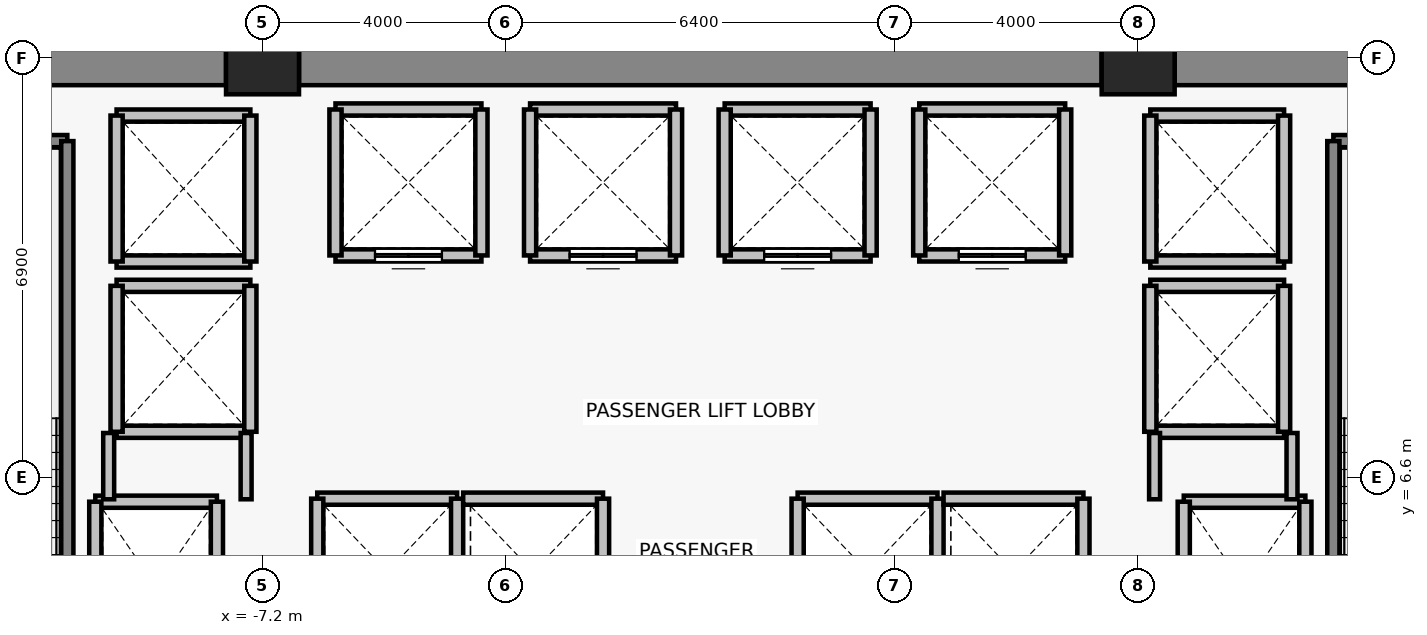
"""IFC4 building model, lengths in metres.
Left out: names, types, materials, properties, quantities, classifications, styles, units other than length and angle.
Written with IfcOpenShell. Run it as: python <this file> out.ifc"""

import sys

from ifc_helpers import new_model, si_unit, direction, frame, frame_2d, origin, origin_2d, place, context, subcontext, project, spatial, rectangle, extrude, source, transform, mapped, element, fill, save


model = new_model("IFC4")
c1 = context("Model", 3, precision=1e-05, world=origin(), true_north=direction((0.0, 1.0)))
c2 = subcontext(c1, "Body", "Model", "MODEL_VIEW")
j1 = project(units=[si_unit("LENGTHUNIT", "METRE"), si_unit("PLANEANGLEUNIT", "RADIAN")], contexts=[c1])
p1 = place(None, origin())
s1 = spatial("IfcSite", under=j1, at=p1, CompositionType="ELEMENT")
p2 = place(p1, origin())
s2 = spatial("IfcBuilding", under=s1, at=p2, CompositionType="ELEMENT")
p3 = place(p2, frame((0.0, 0.0, 53.8)))
s3 = spatial("IfcBuildingStorey", under=s2, at=p3, CompositionType="ELEMENT", Elevation=53.8)
for number, where, z_axis, x_axis in (
    (1, (-7.2, 13.5, 0.0), (0.0, 0.0, 1.0), (1.0, 0.0, 0.0)),
    (2, (7.2, 13.5, 0.0), (0.0, 0.0, 1.0), (1.0, 0.0, 0.0)),
):
    element("IfcColumn", number, at=place(p3, frame(where, z_axis=z_axis, x_axis=x_axis)), inside=s3, PredefinedType="COLUMN", context=c2, shape_type="SweptSolid", body=[
        extrude(rectangle(XDim=1.2, YDim=1.2, at=origin_2d()), origin(), (0.0, 0.0, 1.0), 3.3),
    ])
p4 = place(p3, frame((-13.8, 13.5, 0.0), z_axis=(0.0, 0.0, 1.0), x_axis=(1.0, 0.0, 0.0)))
e3 = element("IfcWall", 3, at=p4, inside=s3, PredefinedType="SHEAR", context=c2, shape_type="SweptSolid", body=[
    extrude(rectangle(XDim=6.0, YDim=0.9, at=frame_2d((3.0, 0.0))), origin(), (0.0, 0.0, 1.0), 3.075),
])
p5 = place(p3, frame((-6.6, 13.5, 0.0), z_axis=(0.0, 0.0, 1.0), x_axis=(1.0, 0.0, 0.0)))
e4 = element("IfcWall", 4, at=p5, inside=s3, PredefinedType="SHEAR", context=c2, shape_type="SweptSolid", body=[
    extrude(rectangle(XDim=13.2, YDim=0.9, at=frame_2d((6.6, 0.0))), origin(), (0.0, 0.0, 1.0), 3.075),
])
p6 = place(p3, frame((7.8, 13.5, 0.0), z_axis=(0.0, 0.0, 1.0), x_axis=(1.0, 0.0, 0.0)))
e5 = element("IfcWall", 5, at=p6, inside=s3, PredefinedType="SHEAR", context=c2, shape_type="SweptSolid", body=[
    extrude(rectangle(XDim=6.0, YDim=0.9, at=frame_2d((3.0, 0.0))), origin(), (0.0, 0.0, 1.0), 3.075),
])
p7 = place(p3, frame((-9.95, 6.2, 0.0), z_axis=(0.0, 0.0, 1.0), x_axis=(1.0, 0.0, 0.0)))
e6 = element("IfcWall", 6, at=p7, inside=s3, PredefinedType="SOLIDWALL", context=c2, shape_type="SweptSolid", body=[
    extrude(rectangle(XDim=2.0, YDim=0.2, at=frame_2d((1.0, 0.0))), origin(), (0.0, 0.0, 1.0), 3.075),
])
for number, where, z_axis, x_axis in (
    (7, (-9.95, 3.4, 0.0), (0.0, 0.0, 1.0), (0.0, 1.0, 0.0)),
    (8, (-7.95, 6.2, 0.0), (0.0, 0.0, 1.0), (0.0, -1.0, 0.0)),
):
    element("IfcWall", number, at=place(p3, frame(where, z_axis=z_axis, x_axis=x_axis)), inside=s3, PredefinedType="SOLIDWALL", context=c2, shape_type="SweptSolid", body=[
        extrude(rectangle(XDim=2.8, YDim=0.2, at=frame_2d((1.4, 0.0))), origin(), (0.0, 0.0, 1.0), 3.075),
    ])
p8 = place(p3, frame((7.95, 6.2, 0.0), z_axis=(0.0, 0.0, 1.0), x_axis=(1.0, 0.0, 0.0)))
e9 = element("IfcWall", 9, at=p8, inside=s3, PredefinedType="SOLIDWALL", context=c2, shape_type="SweptSolid", body=[
    extrude(rectangle(XDim=2.0, YDim=0.2, at=frame_2d((1.0, 0.0))), origin(), (0.0, 0.0, 1.0), 3.075),
])
for number, where, z_axis, x_axis in (
    (10, (7.95, 3.4, 0.0), (0.0, 0.0, 1.0), (0.0, 1.0, 0.0)),
    (11, (9.95, 6.2, 0.0), (0.0, 0.0, 1.0), (0.0, -1.0, 0.0)),
):
    element("IfcWall", number, at=place(p3, frame(where, z_axis=z_axis, x_axis=x_axis)), inside=s3, PredefinedType="SOLIDWALL", context=c2, shape_type="SweptSolid", body=[
        extrude(rectangle(XDim=2.8, YDim=0.2, at=frame_2d((1.4, 0.0))), origin(), (0.0, 0.0, 1.0), 3.075),
    ])
p9 = place(p3, frame((-3.6, 10.25, 0.0), z_axis=(0.0, 0.0, 1.0), x_axis=(-1.0, 0.0, 0.0)))
e12 = element("IfcWall", 12, at=p9, inside=s3, PredefinedType="SOLIDWALL", context=c2, shape_type="SweptSolid", body=[
    extrude(rectangle(XDim=2.4, YDim=0.2, at=frame_2d((1.2, 0.0))), origin(), (0.0, 0.0, 1.0), 3.075),
])
p10 = place(p9, frame((0.65, 0.0, 0.0)))
e13 = element("IfcOpeningElement", 13, at=p10, cuts=e12, PredefinedType="OPENING", context=c2, shape_type="SweptSolid", body=[
    extrude(rectangle(XDim=1.1, YDim=2.2, at=frame_2d((0.55, 1.1))), frame((0.0, 0.11, 0.0), z_axis=(0.0, -1.0, 0.0), x_axis=(1.0, 0.0, 0.0)), (0.0, 0.0, 1.0), 0.22),
])
for number, where, z_axis, x_axis in (
    (14, (-6.0, 12.65, 0.0), (0.0, 0.0, 1.0), (1.0, 0.0, 0.0)),
    (15, (-6.0, 10.25, 0.0), (0.0, 0.0, 1.0), (0.0, 1.0, 0.0)),
    (16, (-3.6, 12.65, 0.0), (0.0, 0.0, 1.0), (0.0, -1.0, 0.0)),
):
    element("IfcWall", number, at=place(p3, frame(where, z_axis=z_axis, x_axis=x_axis)), inside=s3, PredefinedType="SOLIDWALL", context=c2, shape_type="SweptSolid", body=[
        extrude(rectangle(XDim=2.4, YDim=0.2, at=frame_2d((1.2, 0.0))), origin(), (0.0, 0.0, 1.0), 3.075),
    ])
p11 = place(p3, frame((-0.4, 10.25, 0.0), z_axis=(0.0, 0.0, 1.0), x_axis=(-1.0, 0.0, 0.0)))
e17 = element("IfcWall", 17, at=p11, inside=s3, PredefinedType="SOLIDWALL", context=c2, shape_type="SweptSolid", body=[
    extrude(rectangle(XDim=2.4, YDim=0.2, at=frame_2d((1.2, 0.0))), origin(), (0.0, 0.0, 1.0), 3.075),
])
p12 = place(p11, frame((0.65, 0.0, 0.0)))
e18 = element("IfcOpeningElement", 18, at=p12, cuts=e17, PredefinedType="OPENING", context=c2, shape_type="SweptSolid", body=[
    extrude(rectangle(XDim=1.1, YDim=2.2, at=frame_2d((0.55, 1.1))), frame((0.0, 0.11, 0.0), z_axis=(0.0, -1.0, 0.0), x_axis=(1.0, 0.0, 0.0)), (0.0, 0.0, 1.0), 0.22),
])
p13 = place(p3, frame((-2.8, 12.65, 0.0), z_axis=(0.0, 0.0, 1.0), x_axis=(1.0, 0.0, 0.0)))
e19 = element("IfcWall", 19, at=p13, inside=s3, PredefinedType="SOLIDWALL", context=c2, shape_type="SweptSolid", body=[
    extrude(rectangle(XDim=2.4, YDim=0.2, at=frame_2d((1.2, 0.0))), origin(), (0.0, 0.0, 1.0), 3.075),
])
for number, where, z_axis, x_axis in (
    (20, (-2.8, 10.25, 0.0), (0.0, 0.0, 1.0), (0.0, 1.0, 0.0)),
    (21, (-0.4, 12.65, 0.0), (0.0, 0.0, 1.0), (0.0, -1.0, 0.0)),
):
    element("IfcWall", number, at=place(p3, frame(where, z_axis=z_axis, x_axis=x_axis)), inside=s3, PredefinedType="SOLIDWALL", context=c2, shape_type="SweptSolid", body=[
        extrude(rectangle(XDim=2.4, YDim=0.2, at=frame_2d((1.2, 0.0))), origin(), (0.0, 0.0, 1.0), 3.075),
    ])
p14 = place(p3, frame((2.8, 10.25, 0.0), z_axis=(0.0, 0.0, 1.0), x_axis=(-1.0, 0.0, 0.0)))
e22 = element("IfcWall", 22, at=p14, inside=s3, PredefinedType="SOLIDWALL", context=c2, shape_type="SweptSolid", body=[
    extrude(rectangle(XDim=2.4, YDim=0.2, at=frame_2d((1.2, 0.0))), origin(), (0.0, 0.0, 1.0), 3.075),
])
p15 = place(p14, frame((0.65, 0.0, 0.0)))
e23 = element("IfcOpeningElement", 23, at=p15, cuts=e22, PredefinedType="OPENING", context=c2, shape_type="SweptSolid", body=[
    extrude(rectangle(XDim=1.1, YDim=2.2, at=frame_2d((0.55, 1.1))), frame((0.0, 0.11, 0.0), z_axis=(0.0, -1.0, 0.0), x_axis=(1.0, 0.0, 0.0)), (0.0, 0.0, 1.0), 0.22),
])
p16 = place(p3, frame((0.4, 12.65, 0.0), z_axis=(0.0, 0.0, 1.0), x_axis=(1.0, 0.0, 0.0)))
e24 = element("IfcWall", 24, at=p16, inside=s3, PredefinedType="SOLIDWALL", context=c2, shape_type="SweptSolid", body=[
    extrude(rectangle(XDim=2.4, YDim=0.2, at=frame_2d((1.2, 0.0))), origin(), (0.0, 0.0, 1.0), 3.075),
])
for number, where, z_axis, x_axis in (
    (25, (0.4, 10.25, 0.0), (0.0, 0.0, 1.0), (0.0, 1.0, 0.0)),
    (26, (2.8, 12.65, 0.0), (0.0, 0.0, 1.0), (0.0, -1.0, 0.0)),
):
    element("IfcWall", number, at=place(p3, frame(where, z_axis=z_axis, x_axis=x_axis)), inside=s3, PredefinedType="SOLIDWALL", context=c2, shape_type="SweptSolid", body=[
        extrude(rectangle(XDim=2.4, YDim=0.2, at=frame_2d((1.2, 0.0))), origin(), (0.0, 0.0, 1.0), 3.075),
    ])
p17 = place(p3, frame((6.0, 10.25, 0.0), z_axis=(0.0, 0.0, 1.0), x_axis=(-1.0, 0.0, 0.0)))
e27 = element("IfcWall", 27, at=p17, inside=s3, PredefinedType="SOLIDWALL", context=c2, shape_type="SweptSolid", body=[
    extrude(rectangle(XDim=2.4, YDim=0.2, at=frame_2d((1.2, 0.0))), origin(), (0.0, 0.0, 1.0), 3.075),
])
p18 = place(p17, frame((0.65, 0.0, 0.0)))
e28 = element("IfcOpeningElement", 28, at=p18, cuts=e27, PredefinedType="OPENING", context=c2, shape_type="SweptSolid", body=[
    extrude(rectangle(XDim=1.1, YDim=2.2, at=frame_2d((0.55, 1.1))), frame((0.0, 0.11, 0.0), z_axis=(0.0, -1.0, 0.0), x_axis=(1.0, 0.0, 0.0)), (0.0, 0.0, 1.0), 0.22),
])
for number, where, z_axis, x_axis in (
    (29, (3.6, 12.65, 0.0), (0.0, 0.0, 1.0), (1.0, 0.0, 0.0)),
    (30, (3.6, 10.25, 0.0), (0.0, 0.0, 1.0), (0.0, 1.0, 0.0)),
    (31, (6.0, 12.65, 0.0), (0.0, 0.0, 1.0), (0.0, -1.0, 0.0)),
):
    element("IfcWall", number, at=place(p3, frame(where, z_axis=z_axis, x_axis=x_axis)), inside=s3, PredefinedType="SOLIDWALL", context=c2, shape_type="SweptSolid", body=[
        extrude(rectangle(XDim=2.4, YDim=0.2, at=frame_2d((1.2, 0.0))), origin(), (0.0, 0.0, 1.0), 3.075),
    ])
p19 = place(p3, frame((-6.3, 6.25, 0.0), z_axis=(0.0, 0.0, 1.0), x_axis=(1.0, 0.0, 0.0)))
e32 = element("IfcWall", 32, at=p19, inside=s3, PredefinedType="SOLIDWALL", context=c2, shape_type="SweptSolid", body=[
    extrude(rectangle(XDim=2.3, YDim=0.2, at=frame_2d((1.15, 0.0))), origin(), (0.0, 0.0, 1.0), 3.075),
])
for number, where, z_axis, x_axis in (
    (33, (-6.3, 3.85, 0.0), (0.0, 0.0, 1.0), (0.0, 1.0, 0.0)),
    (34, (-4.0, 6.25, 0.0), (0.0, 0.0, 1.0), (0.0, -1.0, 0.0)),
):
    element("IfcWall", number, at=place(p3, frame(where, z_axis=z_axis, x_axis=x_axis)), inside=s3, PredefinedType="SOLIDWALL", context=c2, shape_type="SweptSolid", body=[
        extrude(rectangle(XDim=2.4, YDim=0.2, at=frame_2d((1.2, 0.0))), origin(), (0.0, 0.0, 1.0), 3.075),
    ])
p20 = place(p3, frame((-3.9, 6.25, 0.0), z_axis=(0.0, 0.0, 1.0), x_axis=(1.0, 0.0, 0.0)))
e35 = element("IfcWall", 35, at=p20, inside=s3, PredefinedType="SOLIDWALL", context=c2, shape_type="SweptSolid", body=[
    extrude(rectangle(XDim=2.3, YDim=0.2, at=frame_2d((1.15, 0.0))), origin(), (0.0, 0.0, 1.0), 3.075),
])
p21 = place(p3, frame((-1.6, 6.25, 0.0), z_axis=(0.0, 0.0, 1.0), x_axis=(0.0, -1.0, 0.0)))
e36 = element("IfcWall", 36, at=p21, inside=s3, PredefinedType="SOLIDWALL", context=c2, shape_type="SweptSolid", body=[
    extrude(rectangle(XDim=2.4, YDim=0.2, at=frame_2d((1.2, 0.0))), origin(), (0.0, 0.0, 1.0), 3.075),
])
p22 = place(p3, frame((1.6, 6.25, 0.0), z_axis=(0.0, 0.0, 1.0), x_axis=(1.0, 0.0, 0.0)))
e37 = element("IfcWall", 37, at=p22, inside=s3, PredefinedType="SOLIDWALL", context=c2, shape_type="SweptSolid", body=[
    extrude(rectangle(XDim=2.3, YDim=0.2, at=frame_2d((1.15, 0.0))), origin(), (0.0, 0.0, 1.0), 3.075),
])
for number, where, z_axis, x_axis in (
    (38, (1.6, 3.85, 0.0), (0.0, 0.0, 1.0), (0.0, 1.0, 0.0)),
    (39, (3.9, 6.25, 0.0), (0.0, 0.0, 1.0), (0.0, -1.0, 0.0)),
):
    element("IfcWall", number, at=place(p3, frame(where, z_axis=z_axis, x_axis=x_axis)), inside=s3, PredefinedType="SOLIDWALL", context=c2, shape_type="SweptSolid", body=[
        extrude(rectangle(XDim=2.4, YDim=0.2, at=frame_2d((1.2, 0.0))), origin(), (0.0, 0.0, 1.0), 3.075),
    ])
p23 = place(p3, frame((4.0, 6.25, 0.0), z_axis=(0.0, 0.0, 1.0), x_axis=(1.0, 0.0, 0.0)))
e40 = element("IfcWall", 40, at=p23, inside=s3, PredefinedType="SOLIDWALL", context=c2, shape_type="SweptSolid", body=[
    extrude(rectangle(XDim=2.3, YDim=0.2, at=frame_2d((1.15, 0.0))), origin(), (0.0, 0.0, 1.0), 3.075),
])
p24 = place(p3, frame((6.3, 6.25, 0.0), z_axis=(0.0, 0.0, 1.0), x_axis=(0.0, -1.0, 0.0)))
e41 = element("IfcWall", 41, at=p24, inside=s3, PredefinedType="SOLIDWALL", context=c2, shape_type="SweptSolid", body=[
    extrude(rectangle(XDim=2.4, YDim=0.2, at=frame_2d((1.2, 0.0))), origin(), (0.0, 0.0, 1.0), 3.075),
])
for number, where, z_axis, x_axis in (
    (42, (-7.4, 7.35, 0.0), (0.0, 0.0, 1.0), (-1.0, 0.0, 0.0)),
    (43, (-9.6, 9.75, 0.0), (0.0, 0.0, 1.0), (1.0, 0.0, 0.0)),
):
    element("IfcWall", number, at=place(p3, frame(where, z_axis=z_axis, x_axis=x_axis)), inside=s3, PredefinedType="SOLIDWALL", context=c2, shape_type="SweptSolid", body=[
        extrude(rectangle(XDim=2.2, YDim=0.2, at=frame_2d((1.1, 0.0))), origin(), (0.0, 0.0, 1.0), 2.465),
    ])
p25 = place(p3, frame((-9.6, 7.35, 0.0), z_axis=(0.0, 0.0, 1.0), x_axis=(0.0, 1.0, 0.0)))
e44 = element("IfcWall", 44, at=p25, inside=s3, PredefinedType="SOLIDWALL", context=c2, shape_type="SweptSolid", body=[
    extrude(rectangle(XDim=2.4, YDim=0.2, at=frame_2d((1.2, 0.0))), origin(), (0.0, 0.0, 1.0), 3.075),
])
p26 = place(p3, frame((-7.4, 9.75, 0.0), z_axis=(0.0, 0.0, 1.0), x_axis=(0.0, -1.0, 0.0)))
e45 = element("IfcWall", 45, at=p26, inside=s3, PredefinedType="SOLIDWALL", context=c2, shape_type="SweptSolid", body=[
    extrude(rectangle(XDim=2.4, YDim=0.2, at=frame_2d((1.2, 0.0))), origin(), (0.0, 0.0, 1.0), 2.465),
])
for number, where, z_axis, x_axis in (
    (46, (-7.4, 10.15, 0.0), (0.0, 0.0, 1.0), (-1.0, 0.0, 0.0)),
    (47, (-9.6, 12.55, 0.0), (0.0, 0.0, 1.0), (1.0, 0.0, 0.0)),
):
    element("IfcWall", number, at=place(p3, frame(where, z_axis=z_axis, x_axis=x_axis)), inside=s3, PredefinedType="SOLIDWALL", context=c2, shape_type="SweptSolid", body=[
        extrude(rectangle(XDim=2.2, YDim=0.2, at=frame_2d((1.1, 0.0))), origin(), (0.0, 0.0, 1.0), 2.465),
    ])
p27 = place(p3, frame((-9.6, 10.15, 0.0), z_axis=(0.0, 0.0, 1.0), x_axis=(0.0, 1.0, 0.0)))
e48 = element("IfcWall", 48, at=p27, inside=s3, PredefinedType="SOLIDWALL", context=c2, shape_type="SweptSolid", body=[
    extrude(rectangle(XDim=2.4, YDim=0.2, at=frame_2d((1.2, 0.0))), origin(), (0.0, 0.0, 1.0), 3.075),
])
p28 = place(p3, frame((-7.4, 12.55, 0.0), z_axis=(0.0, 0.0, 1.0), x_axis=(0.0, -1.0, 0.0)))
e49 = element("IfcWall", 49, at=p28, inside=s3, PredefinedType="SOLIDWALL", context=c2, shape_type="SweptSolid", body=[
    extrude(rectangle(XDim=2.4, YDim=0.2, at=frame_2d((1.2, 0.0))), origin(), (0.0, 0.0, 1.0), 2.465),
])
for number, where, z_axis, x_axis in (
    (50, (9.6, 7.35, 0.0), (0.0, 0.0, 1.0), (-1.0, 0.0, 0.0)),
    (51, (7.4, 9.75, 0.0), (0.0, 0.0, 1.0), (1.0, 0.0, 0.0)),
):
    element("IfcWall", number, at=place(p3, frame(where, z_axis=z_axis, x_axis=x_axis)), inside=s3, PredefinedType="SOLIDWALL", context=c2, shape_type="SweptSolid", body=[
        extrude(rectangle(XDim=2.2, YDim=0.2, at=frame_2d((1.1, 0.0))), origin(), (0.0, 0.0, 1.0), 2.465),
    ])
p29 = place(p3, frame((7.4, 7.35, 0.0), z_axis=(0.0, 0.0, 1.0), x_axis=(0.0, 1.0, 0.0)))
e52 = element("IfcWall", 52, at=p29, inside=s3, PredefinedType="SOLIDWALL", context=c2, shape_type="SweptSolid", body=[
    extrude(rectangle(XDim=2.4, YDim=0.2, at=frame_2d((1.2, 0.0))), origin(), (0.0, 0.0, 1.0), 2.465),
])
p30 = place(p3, frame((9.6, 9.75, 0.0), z_axis=(0.0, 0.0, 1.0), x_axis=(0.0, -1.0, 0.0)))
e53 = element("IfcWall", 53, at=p30, inside=s3, PredefinedType="SOLIDWALL", context=c2, shape_type="SweptSolid", body=[
    extrude(rectangle(XDim=2.4, YDim=0.2, at=frame_2d((1.2, 0.0))), origin(), (0.0, 0.0, 1.0), 3.075),
])
for number, where, z_axis, x_axis in (
    (54, (9.6, 10.15, 0.0), (0.0, 0.0, 1.0), (-1.0, 0.0, 0.0)),
    (55, (7.4, 12.55, 0.0), (0.0, 0.0, 1.0), (1.0, 0.0, 0.0)),
):
    element("IfcWall", number, at=place(p3, frame(where, z_axis=z_axis, x_axis=x_axis)), inside=s3, PredefinedType="SOLIDWALL", context=c2, shape_type="SweptSolid", body=[
        extrude(rectangle(XDim=2.2, YDim=0.2, at=frame_2d((1.1, 0.0))), origin(), (0.0, 0.0, 1.0), 2.465),
    ])
p31 = place(p3, frame((7.4, 10.15, 0.0), z_axis=(0.0, 0.0, 1.0), x_axis=(0.0, 1.0, 0.0)))
e56 = element("IfcWall", 56, at=p31, inside=s3, PredefinedType="SOLIDWALL", context=c2, shape_type="SweptSolid", body=[
    extrude(rectangle(XDim=2.4, YDim=0.2, at=frame_2d((1.2, 0.0))), origin(), (0.0, 0.0, 1.0), 2.465),
])
p32 = place(p3, frame((9.6, 12.55, 0.0), z_axis=(0.0, 0.0, 1.0), x_axis=(0.0, -1.0, 0.0)))
e57 = element("IfcWall", 57, at=p32, inside=s3, PredefinedType="SOLIDWALL", context=c2, shape_type="SweptSolid", body=[
    extrude(rectangle(XDim=2.4, YDim=0.2, at=frame_2d((1.2, 0.0))), origin(), (0.0, 0.0, 1.0), 3.075),
])
p33 = place(p3, frame((-13.93, 12.13, 0.0), z_axis=(0.0, 0.0, 1.0), x_axis=(1.0, 0.0, 0.0)))
e58 = element("IfcWall", 58, at=p33, inside=s3, PredefinedType="SOLIDWALL", context=c2, shape_type="SweptSolid", body=[
    extrude(rectangle(XDim=3.52, YDim=0.2, at=frame_2d((1.76, 0.0))), origin(), (0.0, 0.0, 1.0), 3.075),
])
p34 = place(p3, frame((-10.41, 12.13, 0.0), z_axis=(0.0, 0.0, 1.0), x_axis=(0.0, -1.0, 0.0)))
e59 = element("IfcWall", 59, at=p34, inside=s3, PredefinedType="SOLIDWALL", context=c2, shape_type="SweptSolid", body=[
    extrude(rectangle(XDim=8.84, YDim=0.2, at=frame_2d((4.42, 0.0))), origin(), (0.0, 0.0, 1.0), 3.075),
])
p35 = place(p3, frame((10.41, 12.13, 0.0), z_axis=(0.0, 0.0, 1.0), x_axis=(1.0, 0.0, 0.0)))
e60 = element("IfcWall", 60, at=p35, inside=s3, PredefinedType="SOLIDWALL", context=c2, shape_type="SweptSolid", body=[
    extrude(rectangle(XDim=3.52, YDim=0.2, at=frame_2d((1.76, 0.0))), origin(), (0.0, 0.0, 1.0), 3.075),
])
p36 = place(p3, frame((10.41, 3.29, 0.0), z_axis=(0.0, 0.0, 1.0), x_axis=(0.0, 1.0, 0.0)))
e61 = element("IfcWall", 61, at=p36, inside=s3, PredefinedType="SOLIDWALL", context=c2, shape_type="SweptSolid", body=[
    extrude(rectangle(XDim=8.84, YDim=0.2, at=frame_2d((4.42, 0.0))), origin(), (0.0, 0.0, 1.0), 3.075),
])
p37 = place(p3, frame((-9.73, 6.24, 0.0), z_axis=(0.0, 0.0, 1.0), x_axis=(0.0, 1.0, 0.0)))
e62 = element("IfcWall", 62, at=p37, inside=s3, PredefinedType="PARTITIONING", context=c2, shape_type="SweptSolid", body=[
    extrude(rectangle(XDim=1.09, YDim=0.18, at=frame_2d((0.545, 0.0))), origin(), (0.0, 0.0, 1.0), 3.075),
])
for number, where, z_axis, x_axis in (
    (63, (-7.47, 7.33, 0.0), (0.0, 0.0, 1.0), (0.0, -1.0, 0.0)),
    (64, (7.47, 6.24, 0.0), (0.0, 0.0, 1.0), (0.0, 1.0, 0.0)),
):
    element("IfcWall", number, at=place(p3, frame(where, z_axis=z_axis, x_axis=x_axis)), inside=s3, PredefinedType="PARTITIONING", context=c2, shape_type="SweptSolid", body=[
        extrude(rectangle(XDim=1.09, YDim=0.18, at=frame_2d((0.545, 0.0))), origin(), (0.0, 0.0, 1.0), 2.465),
    ])
p38 = place(p3, frame((9.73, 7.33, 0.0), z_axis=(0.0, 0.0, 1.0), x_axis=(0.0, -1.0, 0.0)))
e65 = element("IfcWall", 65, at=p38, inside=s3, PredefinedType="PARTITIONING", context=c2, shape_type="SweptSolid", body=[
    extrude(rectangle(XDim=1.09, YDim=0.18, at=frame_2d((0.545, 0.0))), origin(), (0.0, 0.0, 1.0), 3.075),
])
m1 = source(origin(), c2, "Body", "SweptSolid", [
    extrude(rectangle(XDim=1.1, YDim=2.2, at=frame_2d((0.55, 1.1))), frame((0.0, 0.025, 0.0), z_axis=(0.0, -1.0, 0.0), x_axis=(1.0, 0.0, 0.0)), (0.0, 0.0, 1.0), 0.05),
])
p39 = place(p10, origin())
e66 = element("IfcDoor", 66, at=p39, inside=s3, OperationType="DOUBLE_DOOR_SLIDING", PredefinedType="DOOR", context=c2, shape_type="MappedRepresentation", body=[
    mapped(m1, transform((0.0, 0.0, 0.0), x_axis=(1.0, 0.0, 0.0), y_axis=(0.0, 1.0, 0.0), z_axis=(0.0, 0.0, 1.0), scale=1.0)),
])
fill(e13, e66)
p40 = place(p12, origin())
e67 = element("IfcDoor", 67, at=p40, inside=s3, OperationType="DOUBLE_DOOR_SLIDING", PredefinedType="DOOR", context=c2, shape_type="MappedRepresentation", body=[
    mapped(m1, transform((0.0, 0.0, 0.0), x_axis=(1.0, 0.0, 0.0), y_axis=(0.0, 1.0, 0.0), z_axis=(0.0, 0.0, 1.0), scale=1.0)),
])
fill(e18, e67)
p41 = place(p15, origin())
e68 = element("IfcDoor", 68, at=p41, inside=s3, OperationType="DOUBLE_DOOR_SLIDING", PredefinedType="DOOR", context=c2, shape_type="MappedRepresentation", body=[
    mapped(m1, transform((0.0, 0.0, 0.0), x_axis=(1.0, 0.0, 0.0), y_axis=(0.0, 1.0, 0.0), z_axis=(0.0, 0.0, 1.0), scale=1.0)),
])
fill(e23, e68)
p42 = place(p18, origin())
e69 = element("IfcDoor", 69, at=p42, inside=s3, OperationType="DOUBLE_DOOR_SLIDING", PredefinedType="DOOR", context=c2, shape_type="MappedRepresentation", body=[
    mapped(m1, transform((0.0, 0.0, 0.0), x_axis=(1.0, 0.0, 0.0), y_axis=(0.0, 1.0, 0.0), z_axis=(0.0, 0.0, 1.0), scale=1.0)),
])
fill(e28, e69)
save(model, sys.argv[1])
